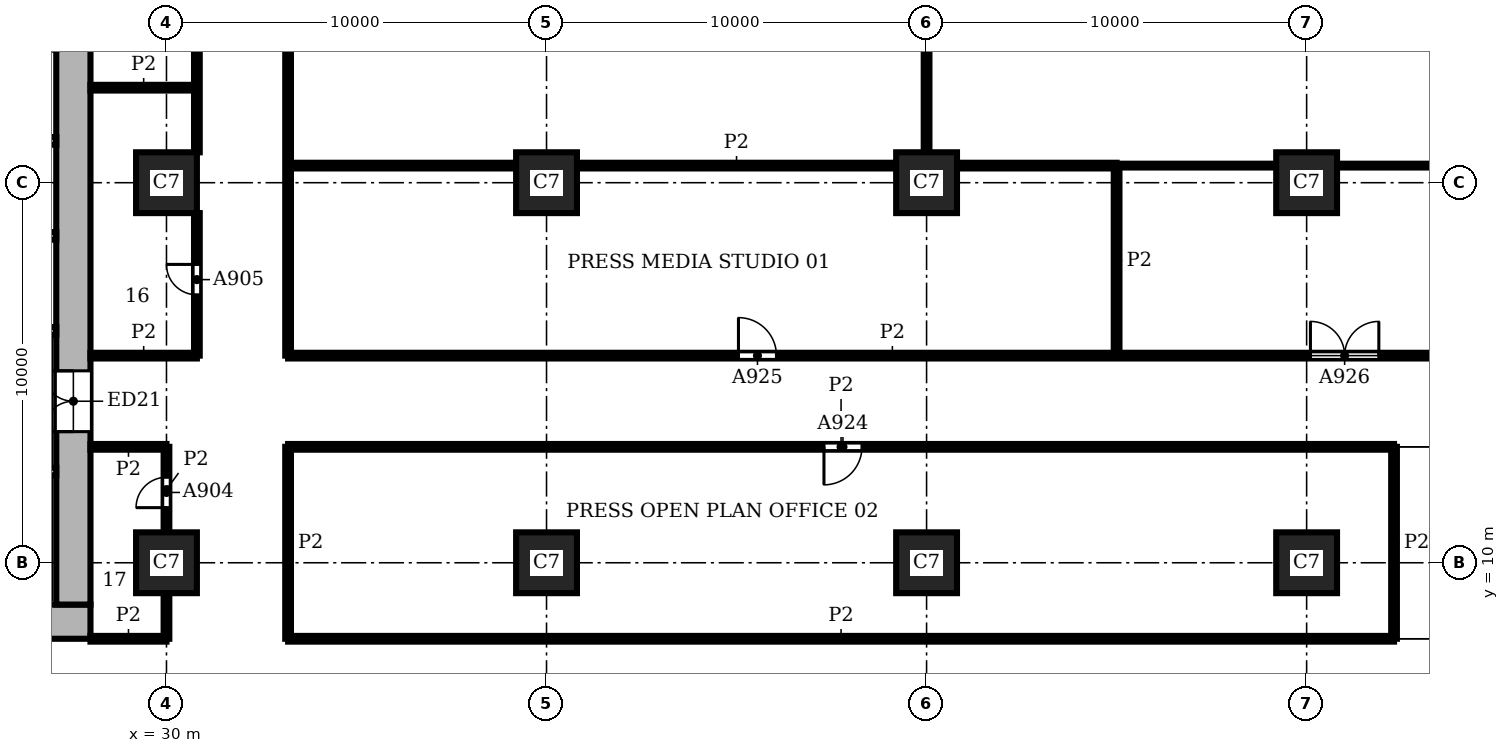
"""IFC4 building model, lengths in metres.
Left out: names, types, materials, properties, quantities, classifications, styles, units other than length and angle.
Written with IfcOpenShell. Run it as: python <this file> out.ifc"""

import sys

from ifc_helpers import new_model, si_unit, direction, frame, frame_2d, origin, origin_2d, place, context, subcontext, project, spatial, rectangle, extrude, element, fill, save


model = new_model("IFC4")
c1 = context("Model", 3, precision=1e-05, world=origin(), true_north=direction((0.0, 1.0)))
c2 = subcontext(c1, "Body", "Model", "MODEL_VIEW")
j1 = project(units=[si_unit("LENGTHUNIT", "METRE"), si_unit("PLANEANGLEUNIT", "RADIAN")], contexts=[c1])
p1 = place(None, origin())
s1 = spatial("IfcSite", under=j1, at=p1, CompositionType="ELEMENT")
p2 = place(p1, origin())
s2 = spatial("IfcBuilding", under=s1, at=p2, CompositionType="ELEMENT")
p3 = place(p2, frame((0.0, 0.0, 113.4)))
s3 = spatial("IfcBuildingStorey", under=s2, at=p3, CompositionType="ELEMENT", Elevation=113.4)
for number, where, z_axis, x_axis in (
    (1, (30.0, 10.0, 0.0), (0.0, 0.0, 1.0), (1.0, 0.0, 0.0)),
    (2, (30.0, 20.0, 0.0), (0.0, 0.0, 1.0), (1.0, 0.0, 0.0)),
    (3, (40.0, 10.0, 0.0), (0.0, 0.0, 1.0), (1.0, 0.0, 0.0)),
    (4, (40.0, 20.0, 0.0), (0.0, 0.0, 1.0), (1.0, 0.0, 0.0)),
    (5, (50.0, 10.0, 0.0), (0.0, 0.0, 1.0), (1.0, 0.0, 0.0)),
    (6, (50.0, 20.0, 0.0), (0.0, 0.0, 1.0), (1.0, 0.0, 0.0)),
    (7, (60.0, 10.0, 0.0), (0.0, 0.0, 1.0), (1.0, 0.0, 0.0)),
    (8, (60.0, 20.0, 0.0), (0.0, 0.0, 1.0), (1.0, 0.0, 0.0)),
):
    element("IfcColumn", number, at=place(p3, frame(where, z_axis=z_axis, x_axis=x_axis)), inside=s3, PredefinedType="COLUMN", context=c2, shape_type="SweptSolid", body=[
        extrude(rectangle(XDim=1.6, YDim=1.6, at=origin_2d()), origin(), (0.0, 0.0, 1.0), 3.9),
    ])
p4 = place(p3, frame((8.0, 8.45, 0.0), z_axis=(0.0, 0.0, 1.0), x_axis=(1.0, 0.0, 0.0)))
e9 = element("IfcWall", 9, at=p4, inside=s3, PredefinedType="SHEAR", context=c2, shape_type="SweptSolid", body=[
    extrude(rectangle(XDim=20.0, YDim=0.9, at=frame_2d((10.0, 0.0))), origin(), (0.0, 0.0, 1.0), 3.9),
])
p5 = place(p3, frame((27.55, 8.9, 0.0), z_axis=(0.0, 0.0, 1.0), x_axis=(0.0, 1.0, 0.0)))
e10 = element("IfcWall", 10, at=p5, inside=s3, PredefinedType="SHEAR", context=c2, shape_type="SweptSolid", body=[
    extrude(rectangle(XDim=18.2, YDim=0.9, at=frame_2d((9.1, 0.0))), origin(), (0.0, 0.0, 1.0), 3.9),
])
p6 = place(p5, frame((4.55, 0.0, 0.0)))
e11 = element("IfcOpeningElement", 11, at=p6, cuts=e10, PredefinedType="OPENING", context=c2, shape_type="SweptSolid", body=[
    extrude(rectangle(XDim=1.6, YDim=2.1, at=frame_2d((0.8, 1.05))), frame((0.0, 0.46, 0.0), z_axis=(0.0, -1.0, 0.0), x_axis=(1.0, 0.0, 0.0)), (0.0, 0.0, 1.0), 0.92),
])
p7 = place(p3, frame((13.8, 12.4, 0.0), z_axis=(0.0, 0.0, 1.0), x_axis=(1.0, 0.0, 0.0)))
e12 = element("IfcWall", 12, at=p7, inside=s3, PredefinedType="SHEAR", context=c2, shape_type="SweptSolid", body=[
    extrude(rectangle(XDim=13.3, YDim=0.2, at=frame_2d((6.65, 0.0))), origin(), (0.0, 0.0, 1.0), 3.45),
])
p8 = place(p7, frame((2.4, 0.0, 0.0)))
e13 = element("IfcOpeningElement", 13, at=p8, cuts=e12, PredefinedType="OPENING", context=c2, shape_type="SweptSolid", body=[
    extrude(rectangle(XDim=1.1, YDim=2.1, at=frame_2d((0.55, 1.05))), frame((0.0, 0.11, 0.0), z_axis=(0.0, -1.0, 0.0), x_axis=(1.0, 0.0, 0.0)), (0.0, 0.0, 1.0), 0.22),
])
p9 = place(p7, frame((4.9, 0.0, 0.0)))
e14 = element("IfcOpeningElement", 14, at=p9, cuts=e12, PredefinedType="OPENING", context=c2, shape_type="SweptSolid", body=[
    extrude(rectangle(XDim=1.1, YDim=2.1, at=frame_2d((0.55, 1.05))), frame((0.0, 0.11, 0.0), z_axis=(0.0, -1.0, 0.0), x_axis=(1.0, 0.0, 0.0)), (0.0, 0.0, 1.0), 0.22),
])
p10 = place(p7, frame((0.25, 0.0, 0.0)))
e15 = element("IfcOpeningElement", 15, at=p10, cuts=e12, PredefinedType="OPENING", context=c2, shape_type="SweptSolid", body=[
    extrude(rectangle(XDim=1.0, YDim=2.1, at=frame_2d((0.5, 1.05))), frame((0.0, 0.11, 0.0), z_axis=(0.0, -1.0, 0.0), x_axis=(1.0, 0.0, 0.0)), (0.0, 0.0, 1.0), 0.22),
])
for number, where, z_axis, x_axis in (
    (16, (24.3, 16.1, 0.0), (0.0, 0.0, 1.0), (1.0, 0.0, 0.0)),
    (17, (24.3, 18.6, 0.0), (0.0, 0.0, 1.0), (1.0, 0.0, 0.0)),
    (18, (24.3, 21.1, 0.0), (0.0, 0.0, 1.0), (1.0, 0.0, 0.0)),
):
    element("IfcWall", number, at=place(p3, frame(where, z_axis=z_axis, x_axis=x_axis)), inside=s3, PredefinedType="SHEAR", context=c2, shape_type="SweptSolid", body=[
        extrude(rectangle(XDim=2.8, YDim=0.2, at=frame_2d((1.4, 0.0))), origin(), (0.0, 0.0, 1.0), 3.45),
    ])
p11 = place(p3, frame((55.0, 20.45, 0.0), z_axis=(0.0, 0.0, 1.0), x_axis=(1.0, 0.0, 0.0)))
e19 = element("IfcWall", 19, at=p11, inside=s3, PredefinedType="PARTITIONING", context=c2, shape_type="SweptSolid", body=[
    extrude(rectangle(XDim=4.2, YDim=0.1, at=frame_2d((2.1, 0.0))), origin(), (0.0, 0.0, 1.0), 3.45),
])
p12 = place(p3, frame((60.8, 20.45, 0.0), z_axis=(0.0, 0.0, 1.0), x_axis=(1.0, 0.0, 0.0)))
e20 = element("IfcWall", 20, at=p12, inside=s3, PredefinedType="PARTITIONING", context=c2, shape_type="SweptSolid", body=[
    extrude(rectangle(XDim=8.7, YDim=0.1, at=frame_2d((4.35, 0.0))), origin(), (0.0, 0.0, 1.0), 3.45),
])
p13 = place(p12, frame((4.4, 0.0, 0.0)))
e21 = element("IfcOpeningElement", 21, at=p13, cuts=e20, PredefinedType="OPENING", context=c2, shape_type="SweptSolid", body=[
    extrude(rectangle(XDim=0.9, YDim=2.1, at=frame_2d((0.45, 1.05))), frame((0.0, 0.06, 0.0), z_axis=(0.0, -1.0, 0.0), x_axis=(1.0, 0.0, 0.0)), (0.0, 0.0, 1.0), 0.12),
])
p14 = place(p3, frame((30.0, 8.0, 0.0), z_axis=(0.0, 0.0, 1.0), x_axis=(0.0, 1.0, 0.0)))
e22 = element("IfcWall", 22, at=p14, inside=s3, PredefinedType="PARTITIONING", context=c2, shape_type="SweptSolid", body=[
    extrude(rectangle(XDim=1.2, YDim=0.15, at=frame_2d((0.6, 0.0))), origin(), (0.0, 0.0, 1.0), 3.45),
])
p15 = place(p3, frame((30.0, 10.8, 0.0), z_axis=(0.0, 0.0, 1.0), x_axis=(0.0, 1.0, 0.0)))
e23 = element("IfcWall", 23, at=p15, inside=s3, PredefinedType="PARTITIONING", context=c2, shape_type="SweptSolid", body=[
    extrude(rectangle(XDim=2.25, YDim=0.15, at=frame_2d((1.125, 0.0))), origin(), (0.0, 0.0, 1.0), 3.45),
])
p16 = place(p15, frame((0.65, 0.0, 0.0)))
e24 = element("IfcOpeningElement", 24, at=p16, cuts=e23, PredefinedType="OPENING", context=c2, shape_type="SweptSolid", body=[
    extrude(rectangle(XDim=0.8, YDim=2.1, at=frame_2d((0.4, 1.05))), frame((0.0, 0.085, 0.0), z_axis=(0.0, -1.0, 0.0), x_axis=(1.0, 0.0, 0.0)), (0.0, 0.0, 1.0), 0.17),
])
p17 = place(p3, frame((30.8, 15.45, 0.0), z_axis=(0.0, 0.0, 1.0), x_axis=(0.0, 1.0, 0.0)))
e25 = element("IfcWall", 25, at=p17, inside=s3, PredefinedType="PARTITIONING", context=c2, shape_type="SweptSolid", body=[
    extrude(rectangle(XDim=3.75, YDim=0.15, at=frame_2d((1.875, 0.0))), origin(), (0.0, 0.0, 1.0), 3.45),
])
p18 = place(p17, frame((1.6, 0.0, 0.0)))
e26 = element("IfcOpeningElement", 26, at=p18, cuts=e25, PredefinedType="OPENING", context=c2, shape_type="SweptSolid", body=[
    extrude(rectangle(XDim=0.8, YDim=2.1, at=frame_2d((0.4, 1.05))), frame((0.0, 0.085, 0.0), z_axis=(0.0, -1.0, 0.0), x_axis=(1.0, 0.0, 0.0)), (0.0, 0.0, 1.0), 0.17),
])
p19 = place(p3, frame((30.8, 20.8, 0.0), z_axis=(0.0, 0.0, 1.0), x_axis=(0.0, 1.0, 0.0)))
e27 = element("IfcWall", 27, at=p19, inside=s3, PredefinedType="PARTITIONING", context=c2, shape_type="SweptSolid", body=[
    extrude(rectangle(XDim=8.4, YDim=0.15, at=frame_2d((4.2, 0.0))), origin(), (0.0, 0.0, 1.0), 3.45),
])
p20 = place(p19, frame((3.8, 0.0, 0.0)))
e28 = element("IfcOpeningElement", 28, at=p20, cuts=e27, PredefinedType="OPENING", context=c2, shape_type="SweptSolid", body=[
    extrude(rectangle(XDim=1.1, YDim=2.1, at=frame_2d((0.55, 1.05))), frame((0.0, 0.085, 0.0), z_axis=(0.0, -1.0, 0.0), x_axis=(1.0, 0.0, 0.0)), (0.0, 0.0, 1.0), 0.17),
])
p21 = place(p3, frame((33.2, 8.0, 0.0), z_axis=(0.0, 0.0, 1.0), x_axis=(0.0, 1.0, 0.0)))
e29 = element("IfcWall", 29, at=p21, inside=s3, PredefinedType="PARTITIONING", context=c2, shape_type="SweptSolid", body=[
    extrude(rectangle(XDim=5.05, YDim=0.15, at=frame_2d((2.525, 0.0))), origin(), (0.0, 0.0, 1.0), 3.45),
])
p22 = place(p3, frame((33.2, 15.45, 0.0), z_axis=(0.0, 0.0, 1.0), x_axis=(0.0, 1.0, 0.0)))
e30 = element("IfcWall", 30, at=p22, inside=s3, PredefinedType="PARTITIONING", context=c2, shape_type="SweptSolid", body=[
    extrude(rectangle(XDim=16.912, YDim=0.15, at=frame_2d((8.456, 0.0))), origin(), (0.0, 0.0, 1.0), 3.45),
])
p23 = place(p22, frame((9.6, 0.0, 0.0)))
e31 = element("IfcOpeningElement", 31, at=p23, cuts=e30, PredefinedType="OPENING", context=c2, shape_type="SweptSolid", body=[
    extrude(rectangle(XDim=1.8, YDim=2.1, at=frame_2d((0.9, 1.05))), frame((0.0, 0.085, 0.0), z_axis=(0.0, -1.0, 0.0), x_axis=(1.0, 0.0, 0.0)), (0.0, 0.0, 1.0), 0.17),
])
p24 = place(p3, frame((50.0, 20.8, 0.0), z_axis=(0.0, 0.0, 1.0), x_axis=(0.0, 1.0, 0.0)))
e32 = element("IfcWall", 32, at=p24, inside=s3, PredefinedType="PARTITIONING", context=c2, shape_type="SweptSolid", body=[
    extrude(rectangle(XDim=8.7, YDim=0.15, at=frame_2d((4.35, 0.0))), origin(), (0.0, 0.0, 1.0), 3.45),
])
p25 = place(p3, frame((55.0, 15.45, 0.0), z_axis=(0.0, 0.0, 1.0), x_axis=(0.0, 1.0, 0.0)))
e33 = element("IfcWall", 33, at=p25, inside=s3, PredefinedType="PARTITIONING", context=c2, shape_type="SweptSolid", body=[
    extrude(rectangle(XDim=5.0, YDim=0.15, at=frame_2d((2.5, 0.0))), origin(), (0.0, 0.0, 1.0), 3.45),
])
p26 = place(p3, frame((62.3, 8.0, 0.0), z_axis=(0.0, 0.0, 1.0), x_axis=(0.0, 1.0, 0.0)))
e34 = element("IfcWall", 34, at=p26, inside=s3, PredefinedType="PARTITIONING", context=c2, shape_type="SweptSolid", body=[
    extrude(rectangle(XDim=5.05, YDim=0.15, at=frame_2d((2.525, 0.0))), origin(), (0.0, 0.0, 1.0), 3.45),
])
p27 = place(p3, frame((28.0, 8.0, 0.0), z_axis=(0.0, 0.0, 1.0), x_axis=(1.0, 0.0, 0.0)))
e35 = element("IfcWall", 35, at=p27, inside=s3, PredefinedType="PARTITIONING", context=c2, shape_type="SweptSolid", body=[
    extrude(rectangle(XDim=2.0, YDim=0.15, at=frame_2d((1.0, 0.0))), origin(), (0.0, 0.0, 1.0), 3.45),
])
p28 = place(p3, frame((33.2, 8.0, 0.0), z_axis=(0.0, 0.0, 1.0), x_axis=(1.0, 0.0, 0.0)))
e36 = element("IfcWall", 36, at=p28, inside=s3, PredefinedType="PARTITIONING", context=c2, shape_type="SweptSolid", body=[
    extrude(rectangle(XDim=29.1, YDim=0.15, at=frame_2d((14.55, 0.0))), origin(), (0.0, 0.0, 1.0), 3.45),
])
p29 = place(p3, frame((28.0, 13.05, 0.0), z_axis=(0.0, 0.0, 1.0), x_axis=(1.0, 0.0, 0.0)))
e37 = element("IfcWall", 37, at=p29, inside=s3, PredefinedType="PARTITIONING", context=c2, shape_type="SweptSolid", body=[
    extrude(rectangle(XDim=2.0, YDim=0.15, at=frame_2d((1.0, 0.0))), origin(), (0.0, 0.0, 1.0), 3.45),
])
p30 = place(p3, frame((33.2, 13.05, 0.0), z_axis=(0.0, 0.0, 1.0), x_axis=(1.0, 0.0, 0.0)))
e38 = element("IfcWall", 38, at=p30, inside=s3, PredefinedType="PARTITIONING", context=c2, shape_type="SweptSolid", body=[
    extrude(rectangle(XDim=29.1, YDim=0.15, at=frame_2d((14.55, 0.0))), origin(), (0.0, 0.0, 1.0), 3.45),
])
p31 = place(p30, frame((14.1, 0.0, 0.0)))
e39 = element("IfcOpeningElement", 39, at=p31, cuts=e38, PredefinedType="OPENING", context=c2, shape_type="SweptSolid", body=[
    extrude(rectangle(XDim=1.0, YDim=2.1, at=frame_2d((0.5, 1.05))), frame((0.0, 0.085, 0.0), z_axis=(0.0, -1.0, 0.0), x_axis=(1.0, 0.0, 0.0)), (0.0, 0.0, 1.0), 0.17),
])
p32 = place(p3, frame((28.0, 15.45, 0.0), z_axis=(0.0, 0.0, 1.0), x_axis=(1.0, 0.0, 0.0)))
e40 = element("IfcWall", 40, at=p32, inside=s3, PredefinedType="PARTITIONING", context=c2, shape_type="SweptSolid", body=[
    extrude(rectangle(XDim=2.8, YDim=0.15, at=frame_2d((1.4, 0.0))), origin(), (0.0, 0.0, 1.0), 3.45),
])
p33 = place(p3, frame((33.2, 15.45, 0.0), z_axis=(0.0, 0.0, 1.0), x_axis=(1.0, 0.0, 0.0)))
e41 = element("IfcWall", 41, at=p33, inside=s3, PredefinedType="PARTITIONING", context=c2, shape_type="SweptSolid", body=[
    extrude(rectangle(XDim=31.8, YDim=0.15, at=frame_2d((15.9, 0.0))), origin(), (0.0, 0.0, 1.0), 3.45),
])
p34 = place(p33, frame((11.85, 0.0, 0.0)))
e42 = element("IfcOpeningElement", 42, at=p34, cuts=e41, PredefinedType="OPENING", context=c2, shape_type="SweptSolid", body=[
    extrude(rectangle(XDim=1.0, YDim=2.1, at=frame_2d((0.5, 1.05))), frame((0.0, 0.085, 0.0), z_axis=(0.0, -1.0, 0.0), x_axis=(1.0, 0.0, 0.0)), (0.0, 0.0, 1.0), 0.17),
])
p35 = place(p33, frame((26.9, 0.0, 0.0)))
e43 = element("IfcOpeningElement", 43, at=p35, cuts=e41, PredefinedType="OPENING", context=c2, shape_type="SweptSolid", body=[
    extrude(rectangle(XDim=1.8, YDim=2.1, at=frame_2d((0.9, 1.05))), frame((0.0, 0.085, 0.0), z_axis=(0.0, -1.0, 0.0), x_axis=(1.0, 0.0, 0.0)), (0.0, 0.0, 1.0), 0.17),
])
p36 = place(p3, frame((33.2, 20.45, 0.0), z_axis=(0.0, 0.0, 1.0), x_axis=(1.0, 0.0, 0.0)))
e44 = element("IfcWall", 44, at=p36, inside=s3, PredefinedType="PARTITIONING", context=c2, shape_type="SweptSolid", body=[
    extrude(rectangle(XDim=6.0, YDim=0.15, at=frame_2d((3.0, 0.0))), origin(), (0.0, 0.0, 1.0), 3.45),
])
p37 = place(p3, frame((40.8, 20.45, 0.0), z_axis=(0.0, 0.0, 1.0), x_axis=(1.0, 0.0, 0.0)))
e45 = element("IfcWall", 45, at=p37, inside=s3, PredefinedType="PARTITIONING", context=c2, shape_type="SweptSolid", body=[
    extrude(rectangle(XDim=8.4, YDim=0.15, at=frame_2d((4.2, 0.0))), origin(), (0.0, 0.0, 1.0), 3.45),
])
p38 = place(p3, frame((50.8, 20.45, 0.0), z_axis=(0.0, 0.0, 1.0), x_axis=(1.0, 0.0, 0.0)))
e46 = element("IfcWall", 46, at=p38, inside=s3, PredefinedType="PARTITIONING", context=c2, shape_type="SweptSolid", body=[
    extrude(rectangle(XDim=4.2, YDim=0.15, at=frame_2d((2.1, 0.0))), origin(), (0.0, 0.0, 1.0), 3.45),
])
p39 = place(p3, frame((28.0, 22.5, 0.0), z_axis=(0.0, 0.0, 1.0), x_axis=(1.0, 0.0, 0.0)))
e47 = element("IfcWall", 47, at=p39, inside=s3, PredefinedType="PARTITIONING", context=c2, shape_type="SweptSolid", body=[
    extrude(rectangle(XDim=2.8, YDim=0.15, at=frame_2d((1.4, 0.0))), origin(), (0.0, 0.0, 1.0), 3.45),
])
p40 = place(p6, origin())
e48 = element("IfcDoor", 48, at=p40, inside=s3, OperationType="DOUBLE_DOOR_SINGLE_SWING", PredefinedType="DOOR", context=c2, shape_type="SweptSolid", body=[
    extrude(rectangle(XDim=1.6, YDim=2.1, at=frame_2d((0.8, 1.05))), frame((0.0, 0.025, 0.0), z_axis=(0.0, -1.0, 0.0), x_axis=(1.0, 0.0, 0.0)), (0.0, 0.0, 1.0), 0.05),
])
fill(e11, e48)
p41 = place(p16, origin())
e49 = element("IfcDoor", 49, at=p41, inside=s3, OperationType="SINGLE_SWING_LEFT", PredefinedType="DOOR", context=c2, shape_type="SweptSolid", body=[
    extrude(rectangle(XDim=0.8, YDim=2.1, at=frame_2d((0.4, 1.05))), frame((0.0, 0.025, 0.0), z_axis=(0.0, -1.0, 0.0), x_axis=(1.0, 0.0, 0.0)), (0.0, 0.0, 1.0), 0.05),
])
fill(e24, e49)
p42 = place(p18, origin())
e50 = element("IfcDoor", 50, at=p42, inside=s3, OperationType="SINGLE_SWING_RIGHT", PredefinedType="DOOR", context=c2, shape_type="SweptSolid", body=[
    extrude(rectangle(XDim=0.8, YDim=2.1, at=frame_2d((0.4, 1.05))), frame((0.0, 0.025, 0.0), z_axis=(0.0, -1.0, 0.0), x_axis=(1.0, 0.0, 0.0)), (0.0, 0.0, 1.0), 0.05),
])
fill(e26, e50)
p43 = place(p31, frame((1.0, 0.0, 0.0), z_axis=(0.0, 0.0, 1.0), x_axis=(-1.0, 0.0, 0.0)))
e51 = element("IfcDoor", 51, at=p43, inside=s3, OperationType="SINGLE_SWING_RIGHT", PredefinedType="DOOR", context=c2, shape_type="SweptSolid", body=[
    extrude(rectangle(XDim=1.0, YDim=2.1, at=frame_2d((0.5, 1.05))), frame((0.0, 0.025, 0.0), z_axis=(0.0, -1.0, 0.0), x_axis=(1.0, 0.0, 0.0)), (0.0, 0.0, 1.0), 0.05),
])
fill(e39, e51)
p44 = place(p34, origin())
e52 = element("IfcDoor", 52, at=p44, inside=s3, OperationType="SINGLE_SWING_LEFT", PredefinedType="DOOR", context=c2, shape_type="SweptSolid", body=[
    extrude(rectangle(XDim=1.0, YDim=2.1, at=frame_2d((0.5, 1.05))), frame((0.0, 0.025, 0.0), z_axis=(0.0, -1.0, 0.0), x_axis=(1.0, 0.0, 0.0)), (0.0, 0.0, 1.0), 0.05),
])
fill(e42, e52)
p45 = place(p35, origin())
e53 = element("IfcDoor", 53, at=p45, inside=s3, OperationType="DOUBLE_DOOR_SINGLE_SWING", PredefinedType="DOOR", context=c2, shape_type="SweptSolid", body=[
    extrude(rectangle(XDim=1.8, YDim=2.1, at=frame_2d((0.9, 1.05))), frame((0.0, 0.025, 0.0), z_axis=(0.0, -1.0, 0.0), x_axis=(1.0, 0.0, 0.0)), (0.0, 0.0, 1.0), 0.05),
])
fill(e43, e53)
save(model, sys.argv[1])
